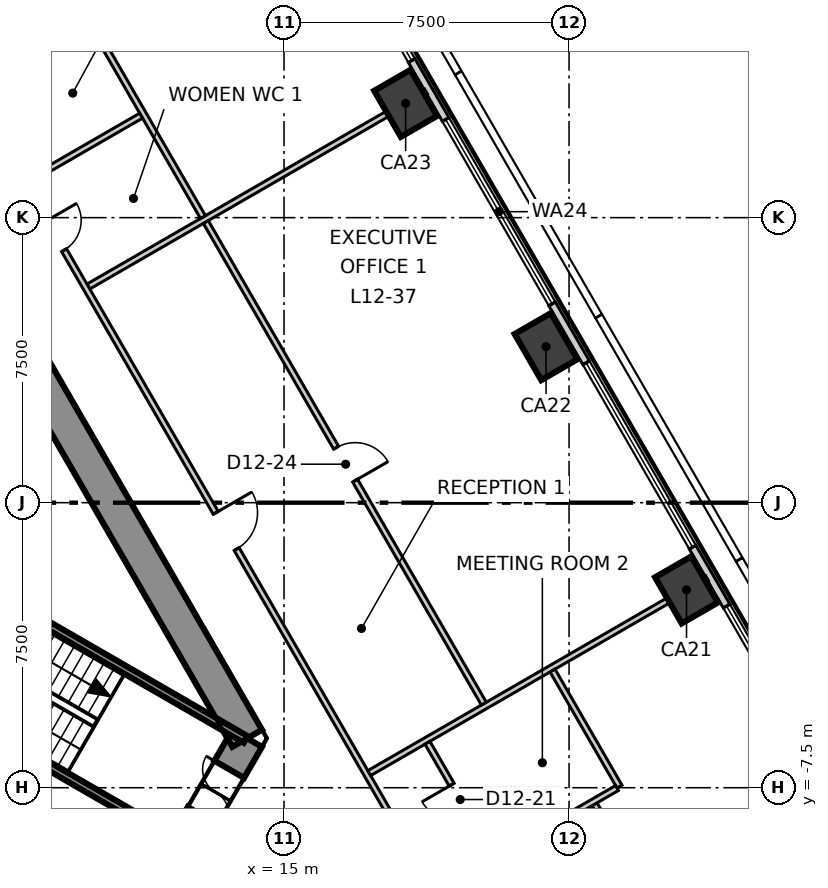
"""IFC4 building model, lengths in metres.
Left out: names, types, materials, properties, quantities, classifications, styles, units other than length and angle.
Written with IfcOpenShell. Run it as: python <this file> out.ifc"""

import sys

from ifc_helpers import new_model, si_unit, direction, frame, frame_2d, origin, origin_2d, place, context, subcontext, project, spatial, polyline, rectangle, outline, extrude, element, fill, save


model = new_model("IFC4")
c1 = context("Model", 3, precision=1e-05, world=origin(), true_north=direction((0.0, 1.0)))
c2 = subcontext(c1, "Body", "Model", "MODEL_VIEW")
j1 = project(units=[si_unit("LENGTHUNIT", "METRE"), si_unit("PLANEANGLEUNIT", "RADIAN")], contexts=[c1])
p1 = place(None, origin())
s1 = spatial("IfcSite", under=j1, at=p1, CompositionType="ELEMENT")
p2 = place(p1, origin())
s2 = spatial("IfcBuilding", under=s1, at=p2, CompositionType="ELEMENT")
p3 = place(p2, frame((0.0, 0.0, 59.3)))
s3 = spatial("IfcBuildingStorey", under=s2, at=p3, CompositionType="ELEMENT", Elevation=59.3)
p4 = place(p3, frame((12.384, -9.05, -0.3), z_axis=(0.0, 0.0, 1.0), x_axis=(0.500111984565, 0.865960739811, 0.0)))
e1 = element("IfcWall", 1, at=p4, inside=s3, PredefinedType="SHEAR", context=c2, shape_type="SweptSolid", body=[
    extrude(outline(polyline([(-0.26, -0.45), (1.646, -0.449), (3.551, -0.449), (3.031, 0.45), (1.646, 0.45), (0.26, 0.45), (-0.26, -0.45)])), origin(), (0.0, 0.0, 1.0), 4.0),
])
p5 = place(p4, frame((0.946, 0.0, 0.3)))
e2 = element("IfcOpeningElement", 2, at=p5, cuts=e1, PredefinedType="OPENING", context=c2, shape_type="SweptSolid", body=[
    extrude(rectangle(XDim=1.4, YDim=2.1, at=frame_2d((0.7, 1.05))), frame((0.0, 0.46, 0.0), z_axis=(0.0, -1.0, 0.0), x_axis=(1.0, 0.0, 0.0)), (0.0, 0.0, 1.0), 0.92),
])
p6 = place(p3, frame((14.03, -6.2, -0.3), z_axis=(0.0, 0.0, 1.0), x_axis=(-0.500026485275, 0.866010111964, 0.0)))
e3 = element("IfcWall", 3, at=p6, inside=s3, PredefinedType="SHEAR", context=c2, shape_type="SweptSolid", body=[
    extrude(outline(polyline([(-0.26, -0.449), (1.685, -0.449), (3.63, -0.449), (5.576, -0.449), (7.521, -0.449), (9.466, -0.449), (11.411, -0.449), (13.357, -0.449), (15.302, -0.449), (17.247, -0.45), (19.192, -0.45), (21.138, -0.45), (23.083, -0.45), (25.028, -0.45), (24.509, 0.449), (22.644, 0.449), (20.778, 0.449), (18.913, 0.449), (17.048, 0.449), (15.182, 0.449), (13.317, 0.449), (11.452, 0.449), (9.587, 0.449), (7.721, 0.45), (5.856, 0.45), (3.991, 0.45), (2.125, 0.45), (0.26, 0.45), (-0.26, -0.449)])), origin(), (0.0, 0.0, 1.0), 4.0),
])
p7 = place(p6, frame((11.484, 0.0, 0.3)))
e4 = element("IfcOpeningElement", 4, at=p7, cuts=e3, PredefinedType="OPENING", context=c2, shape_type="SweptSolid", body=[
    extrude(rectangle(XDim=1.8, YDim=2.1, at=frame_2d((0.9, 1.05))), frame((0.0, 0.46, 0.0), z_axis=(0.0, -1.0, 0.0), x_axis=(1.0, 0.0, 0.0)), (0.0, 0.0, 1.0), 0.92),
])
p8 = place(p6, frame((18.914, 0.0, 0.3)))
e5 = element("IfcOpeningElement", 5, at=p8, cuts=e3, PredefinedType="OPENING", context=c2, shape_type="SweptSolid", body=[
    extrude(rectangle(XDim=1.0, YDim=2.1, at=frame_2d((0.5, 1.05))), frame((0.0, 0.46, 0.0), z_axis=(0.0, -1.0, 0.0), x_axis=(1.0, 0.0, 0.0)), (0.0, 0.0, 1.0), 0.92),
])
for number, where, z_axis, x_axis in (
    (6, (25.591, -2.295, -0.3), (0.0, 0.0, 1.0), (-0.5, 0.866, 0.0)),
    (7, (21.895, 4.106, -0.3), (0.0, 0.0, 1.0), (-0.5, 0.866, 0.0)),
    (8, (18.2, 10.507, -0.3), (0.0, 0.0, 1.0), (-0.5, 0.866, 0.0)),
):
    element("IfcColumn", number, at=place(p3, frame(where, z_axis=z_axis, x_axis=x_axis)), inside=s3, PredefinedType="COLUMN", context=c2, shape_type="SweptSolid", body=[
        extrude(rectangle(XDim=1.4, YDim=1.1, at=origin_2d()), origin(), (0.0, 0.0, 1.0), 4.0),
    ])
p9 = place(p3, frame((34.241, -15.876, 0.0), z_axis=(0.0, 0.0, 1.0), x_axis=(-0.500006313899, 0.866021758423, 0.0)))
e9 = element("IfcWall", 9, at=p9, inside=s3, PredefinedType="ELEMENTEDWALL", context=c2, shape_type="SweptSolid", body=[
    extrude(rectangle(XDim=61.719, YDim=0.2, at=frame_2d((30.859, 0.0))), origin(), (0.0, 0.0, 1.0), 3.7),
])
p10 = place(p9, frame((2.199, 0.0, 0.9)))
e10 = element("IfcOpeningElement", 10, at=p10, cuts=e9, PredefinedType="OPENING", context=c2, shape_type="SweptSolid", body=[
    extrude(rectangle(XDim=5.6, YDim=2.5, at=frame_2d((2.8, 1.25))), frame((0.0, 0.11, 0.0), z_axis=(0.0, -1.0, 0.0), x_axis=(1.0, 0.0, 0.0)), (0.0, 0.0, 1.0), 0.22),
])
p11 = place(p9, frame((9.59, 0.0, 0.9)))
e11 = element("IfcOpeningElement", 11, at=p11, cuts=e9, PredefinedType="OPENING", context=c2, shape_type="SweptSolid", body=[
    extrude(rectangle(XDim=5.6, YDim=2.5, at=frame_2d((2.8, 1.25))), frame((0.0, 0.11, 0.0), z_axis=(0.0, -1.0, 0.0), x_axis=(1.0, 0.0, 0.0)), (0.0, 0.0, 1.0), 0.22),
])
p12 = place(p9, frame((16.982, 0.0, 0.9)))
e12 = element("IfcOpeningElement", 12, at=p12, cuts=e9, PredefinedType="OPENING", context=c2, shape_type="SweptSolid", body=[
    extrude(rectangle(XDim=5.6, YDim=2.5, at=frame_2d((2.8, 1.25))), frame((0.0, 0.11, 0.0), z_axis=(0.0, -1.0, 0.0), x_axis=(1.0, 0.0, 0.0)), (0.0, 0.0, 1.0), 0.22),
])
p13 = place(p9, frame((24.374, 0.0, 0.9)))
e13 = element("IfcOpeningElement", 13, at=p13, cuts=e9, PredefinedType="OPENING", context=c2, shape_type="SweptSolid", body=[
    extrude(rectangle(XDim=5.6, YDim=2.5, at=frame_2d((2.8, 1.25))), frame((0.0, 0.11, 0.0), z_axis=(0.0, -1.0, 0.0), x_axis=(1.0, 0.0, 0.0)), (0.0, 0.0, 1.0), 0.22),
])
p14 = place(p9, frame((31.765, 0.0, 0.9)))
e14 = element("IfcOpeningElement", 14, at=p14, cuts=e9, PredefinedType="OPENING", context=c2, shape_type="SweptSolid", body=[
    extrude(rectangle(XDim=5.6, YDim=2.5, at=frame_2d((2.8, 1.25))), frame((0.0, 0.11, 0.0), z_axis=(0.0, -1.0, 0.0), x_axis=(1.0, 0.0, 0.0)), (0.0, 0.0, 1.0), 0.22),
])
p15 = place(p9, frame((39.157, 0.0, 0.9)))
e15 = element("IfcOpeningElement", 15, at=p15, cuts=e9, PredefinedType="OPENING", context=c2, shape_type="SweptSolid", body=[
    extrude(rectangle(XDim=5.6, YDim=2.5, at=frame_2d((2.8, 1.25))), frame((0.0, 0.11, 0.0), z_axis=(0.0, -1.0, 0.0), x_axis=(1.0, 0.0, 0.0)), (0.0, 0.0, 1.0), 0.22),
])
p16 = place(p9, frame((46.549, 0.0, 0.9)))
e16 = element("IfcOpeningElement", 16, at=p16, cuts=e9, PredefinedType="OPENING", context=c2, shape_type="SweptSolid", body=[
    extrude(rectangle(XDim=5.6, YDim=2.5, at=frame_2d((2.8, 1.25))), frame((0.0, 0.11, 0.0), z_axis=(0.0, -1.0, 0.0), x_axis=(1.0, 0.0, 0.0)), (0.0, 0.0, 1.0), 0.22),
])
p17 = place(p9, frame((53.94, 0.0, 0.9)))
e17 = element("IfcOpeningElement", 17, at=p17, cuts=e9, PredefinedType="OPENING", context=c2, shape_type="SweptSolid", body=[
    extrude(rectangle(XDim=5.6, YDim=2.5, at=frame_2d((2.8, 1.25))), frame((0.0, 0.11, 0.0), z_axis=(0.0, -1.0, 0.0), x_axis=(1.0, 0.0, 0.0)), (0.0, 0.0, 1.0), 0.22),
])
p18 = place(p3, frame((9.851, 5.687, 0.0), z_axis=(0.0, 0.0, 1.0), x_axis=(0.865968814955, 0.500098001921, 0.0)))
e18 = element("IfcWall", 18, at=p18, inside=s3, PredefinedType="PARTITIONING", context=c2, shape_type="SweptSolid", body=[
    extrude(rectangle(XDim=10.26, YDim=0.15, at=frame_2d((5.13, 0.0))), origin(), (0.0, 0.0, 1.0), 3.2),
])
p19 = place(p3, frame((0.075, 22.47, 0.0), z_axis=(0.0, 0.0, 1.0), x_axis=(0.500002280369, -0.866024087209, 0.0)))
e19 = element("IfcWall", 19, at=p19, inside=s3, PredefinedType="PARTITIONING", context=c2, shape_type="SweptSolid", body=[
    extrude(rectangle(XDim=38.844, YDim=0.15, at=frame_2d((19.422, 0.0))), origin(), (0.0, 0.0, 1.0), 3.7),
])
p20 = place(p19, frame((36.044, 0.0, 0.0)))
e20 = element("IfcOpeningElement", 20, at=p20, cuts=e19, PredefinedType="OPENING", context=c2, shape_type="SweptSolid", body=[
    extrude(rectangle(XDim=1.1, YDim=2.1, at=frame_2d((0.55, 1.05))), frame((0.0, 0.085, 0.0), z_axis=(0.0, -1.0, 0.0), x_axis=(1.0, 0.0, 0.0)), (0.0, 0.0, 1.0), 0.17),
])
p21 = place(p19, frame((26.255, 0.0, 0.0)))
e21 = element("IfcOpeningElement", 21, at=p21, cuts=e19, PredefinedType="OPENING", context=c2, shape_type="SweptSolid", body=[
    extrude(rectangle(XDim=1.1, YDim=2.1, at=frame_2d((0.55, 1.05))), frame((0.0, 0.085, 0.0), z_axis=(0.0, -1.0, 0.0), x_axis=(1.0, 0.0, 0.0)), (0.0, 0.0, 1.0), 0.17),
])
p22 = place(p19, frame((9.173, 0.0, 0.0)))
e22 = element("IfcOpeningElement", 22, at=p22, cuts=e19, PredefinedType="OPENING", context=c2, shape_type="SweptSolid", body=[
    extrude(rectangle(XDim=1.1, YDim=2.1, at=frame_2d((0.55, 1.05))), frame((0.0, 0.085, 0.0), z_axis=(0.0, -1.0, 0.0), x_axis=(1.0, 0.0, 0.0)), (0.0, 0.0, 1.0), 0.17),
])
p23 = place(p19, frame((17.373, 0.0, 0.0)))
e23 = element("IfcOpeningElement", 23, at=p23, cuts=e19, PredefinedType="OPENING", context=c2, shape_type="SweptSolid", body=[
    extrude(rectangle(XDim=0.9, YDim=2.1, at=frame_2d((0.45, 1.05))), frame((0.0, 0.085, 0.0), z_axis=(0.0, -1.0, 0.0), x_axis=(1.0, 0.0, 0.0)), (0.0, 0.0, 1.0), 0.17),
])
p24 = place(p19, frame((14.173, 0.0, 0.0)))
e24 = element("IfcOpeningElement", 24, at=p24, cuts=e19, PredefinedType="OPENING", context=c2, shape_type="SweptSolid", body=[
    extrude(rectangle(XDim=0.9, YDim=2.1, at=frame_2d((0.45, 1.05))), frame((0.0, 0.085, 0.0), z_axis=(0.0, -1.0, 0.0), x_axis=(1.0, 0.0, 0.0)), (0.0, 0.0, 1.0), 0.17),
])
p25 = place(p19, frame((11.273, 0.0, 0.0)))
e25 = element("IfcOpeningElement", 25, at=p25, cuts=e19, PredefinedType="OPENING", context=c2, shape_type="SweptSolid", body=[
    extrude(rectangle(XDim=1.0, YDim=2.1, at=frame_2d((0.5, 1.05))), frame((0.0, 0.085, 0.0), z_axis=(0.0, -1.0, 0.0), x_axis=(1.0, 0.0, 0.0)), (0.0, 0.0, 1.0), 0.17),
])
p26 = place(p19, frame((1.689, 0.0, 0.0)))
e26 = element("IfcOpeningElement", 26, at=p26, cuts=e19, PredefinedType="OPENING", context=c2, shape_type="SweptSolid", body=[
    extrude(rectangle(XDim=1.1, YDim=2.1, at=frame_2d((0.55, 1.05))), frame((0.0, 0.085, 0.0), z_axis=(0.0, -1.0, 0.0), x_axis=(1.0, 0.0, 0.0)), (0.0, 0.0, 1.0), 0.17),
])
p27 = place(p3, frame((8.504, 15.07, 0.0), z_axis=(0.0, 0.0, 1.0), x_axis=(0.500042162787, -0.86600105972, 0.0)))
e27 = element("IfcWall", 27, at=p27, inside=s3, PredefinedType="PARTITIONING", context=c2, shape_type="SweptSolid", body=[
    extrude(rectangle(XDim=8.725, YDim=0.15, at=frame_2d((4.363, 0.0))), origin(), (0.0, 0.0, 1.0), 3.7),
])
for number, where, z_axis, x_axis in (
    (28, (6.651, 11.229, 0.0), (0.0, 0.0, 1.0), (0.866, 0.5, 0.0)),
    (29, (8.251, 8.458, 0.0), (0.0, 0.0, 1.0), (0.866, 0.5, 0.0)),
):
    element("IfcWall", number, at=place(p3, frame(where, z_axis=z_axis, x_axis=x_axis)), inside=s3, PredefinedType="PARTITIONING", context=c2, shape_type="SweptSolid", body=[
        extrude(rectangle(XDim=3.45, YDim=0.15, at=frame_2d((1.725, 0.0))), origin(), (0.0, 0.0, 1.0), 3.7),
    ])
p28 = place(p3, frame((17.243, -7.115, 0.0), z_axis=(0.0, 0.0, 1.0), x_axis=(0.866020337685, 0.500008774639, 0.0)))
e30 = element("IfcWall", 30, at=p28, inside=s3, PredefinedType="PARTITIONING", context=c2, shape_type="SweptSolid", body=[
    extrude(rectangle(XDim=10.26, YDim=0.15, at=frame_2d((5.13, 0.0))), origin(), (0.0, 0.0, 1.0), 3.7),
])
p29 = place(p3, frame((23.172, -7.935, 0.0), z_axis=(0.0, 0.0, 1.0), x_axis=(0.500266112279, -0.865871709265, 0.0)))
e31 = element("IfcWall", 31, at=p29, inside=s3, PredefinedType="PARTITIONING", context=c2, shape_type="SweptSolid", body=[
    extrude(rectangle(XDim=2.125, YDim=0.15, at=frame_2d((1.062, 0.0))), origin(), (0.0, 0.0, 1.0), 3.7),
])
p30 = place(p3, frame((18.774, -6.317, 0.0), z_axis=(0.0, 0.0, 1.0), x_axis=(0.499941490393, -0.866059181686, 0.0)))
e32 = element("IfcWall", 32, at=p30, inside=s3, PredefinedType="PARTITIONING", context=c2, shape_type="SweptSolid", body=[
    extrude(rectangle(XDim=5.725, YDim=0.15, at=frame_2d((2.862, 0.0))), origin(), (0.0, 0.0, 1.0), 3.7),
])
p31 = place(p30, frame((1.275, 0.0, 0.0)))
e33 = element("IfcOpeningElement", 33, at=p31, cuts=e32, PredefinedType="OPENING", context=c2, shape_type="SweptSolid", body=[
    extrude(rectangle(XDim=0.9, YDim=2.1, at=frame_2d((0.45, 1.05))), frame((0.0, 0.085, 0.0), z_axis=(0.0, -1.0, 0.0), x_axis=(1.0, 0.0, 0.0)), (0.0, 0.0, 1.0), 0.17),
])
p32 = place(p3, frame((22.065, -4.417, 0.0), z_axis=(0.0, 0.0, 1.0), x_axis=(0.499856357168, -0.86610832013, 0.0)))
e34 = element("IfcWall", 34, at=p32, inside=s3, PredefinedType="PARTITIONING", context=c2, shape_type="SweptSolid", body=[
    extrude(rectangle(XDim=3.525, YDim=0.15, at=frame_2d((1.762, 0.0))), origin(), (0.0, 0.0, 1.0), 3.7),
])
p33 = place(p3, frame((12.942, 7.384, 0.0), z_axis=(0.0, 0.0, 1.0), x_axis=(0.499995423472, -0.866028046028, 0.0)))
e35 = element("IfcWall", 35, at=p33, inside=s3, PredefinedType="PARTITIONING", context=c2, shape_type="SweptSolid", body=[
    extrude(rectangle(XDim=14.633, YDim=0.15, at=frame_2d((7.316, 0.0))), origin(), (0.0, 0.0, 1.0), 3.7),
])
p34 = place(p33, frame((6.857, 0.0, 0.0)))
e36 = element("IfcOpeningElement", 36, at=p34, cuts=e35, PredefinedType="OPENING", context=c2, shape_type="SweptSolid", body=[
    extrude(rectangle(XDim=1.0, YDim=2.1, at=frame_2d((0.5, 1.05))), frame((0.0, 0.085, 0.0), z_axis=(0.0, -1.0, 0.0), x_axis=(1.0, 0.0, 0.0)), (0.0, 0.0, 1.0), 0.17),
])
p35 = place(p3, frame((20.601, -9.333, 0.0), z_axis=(0.0, 0.0, 1.0), x_axis=(0.866024069551, 0.500002310952, 0.0)))
e37 = element("IfcWall", 37, at=p35, inside=s3, PredefinedType="PARTITIONING", context=c2, shape_type="SweptSolid", body=[
    extrude(rectangle(XDim=3.65, YDim=0.15, at=frame_2d((1.825, 0.0))), origin(), (0.0, 0.0, 1.0), 3.7),
])
p36 = place(p3, frame((4.929, -4.693, 0.0), z_axis=(0.0, 0.0, 1.0), x_axis=(0.866010975815, -0.500024989144, 0.0)))
e38 = element("IfcWall", 38, at=p36, inside=s3, PredefinedType="SOLIDWALL", context=c2, shape_type="SweptSolid", body=[
    extrude(rectangle(XDim=8.615, YDim=0.2, at=frame_2d((4.308, 0.0))), origin(), (0.0, 0.0, 1.0), 3.7),
])
p37 = place(p3, frame((6.529, -1.922, 0.0), z_axis=(0.0, 0.0, 1.0), x_axis=(0.866060059011, -0.499939970583, 0.0)))
e39 = element("IfcWall", 39, at=p37, inside=s3, PredefinedType="SOLIDWALL", context=c2, shape_type="SweptSolid", body=[
    extrude(rectangle(XDim=8.615, YDim=0.2, at=frame_2d((4.307, 0.0))), origin(), (0.0, 0.0, 1.0), 3.7),
])
p38 = place(p11, origin())
e40 = element("IfcWindow", 40, at=p38, inside=s3, PartitioningType="SINGLE_PANEL", PredefinedType="WINDOW", context=c2, shape_type="SweptSolid", body=[
    extrude(rectangle(XDim=5.6, YDim=2.5, at=frame_2d((2.8, 1.25))), frame((0.0, 0.03, 0.0), z_axis=(0.0, -1.0, 0.0), x_axis=(1.0, 0.0, 0.0)), (0.0, 0.0, 1.0), 0.06),
])
fill(e11, e40)
p39 = place(p12, origin())
e41 = element("IfcWindow", 41, at=p39, inside=s3, PartitioningType="SINGLE_PANEL", PredefinedType="WINDOW", context=c2, shape_type="SweptSolid", body=[
    extrude(rectangle(XDim=5.6, YDim=2.5, at=frame_2d((2.8, 1.25))), frame((0.0, 0.03, 0.0), z_axis=(0.0, -1.0, 0.0), x_axis=(1.0, 0.0, 0.0)), (0.0, 0.0, 1.0), 0.06),
])
fill(e12, e41)
p40 = place(p13, origin())
e42 = element("IfcWindow", 42, at=p40, inside=s3, PartitioningType="SINGLE_PANEL", PredefinedType="WINDOW", context=c2, shape_type="SweptSolid", body=[
    extrude(rectangle(XDim=5.6, YDim=2.5, at=frame_2d((2.8, 1.25))), frame((0.0, 0.03, 0.0), z_axis=(0.0, -1.0, 0.0), x_axis=(1.0, 0.0, 0.0)), (0.0, 0.0, 1.0), 0.06),
])
fill(e13, e42)
p41 = place(p14, origin())
e43 = element("IfcWindow", 43, at=p41, inside=s3, PartitioningType="SINGLE_PANEL", PredefinedType="WINDOW", context=c2, shape_type="SweptSolid", body=[
    extrude(rectangle(XDim=5.6, YDim=2.5, at=frame_2d((2.8, 1.25))), frame((0.0, 0.03, 0.0), z_axis=(0.0, -1.0, 0.0), x_axis=(1.0, 0.0, 0.0)), (0.0, 0.0, 1.0), 0.06),
])
fill(e14, e43)
p42 = place(p31, origin())
e44 = element("IfcDoor", 44, at=p42, inside=s3, OperationType="SINGLE_SWING_LEFT", PredefinedType="DOOR", context=c2, shape_type="SweptSolid", body=[
    extrude(rectangle(XDim=0.9, YDim=2.1, at=frame_2d((0.45, 1.05))), frame((0.0, 0.025, 0.0), z_axis=(0.0, -1.0, 0.0), x_axis=(1.0, 0.0, 0.0)), (0.0, 0.0, 1.0), 0.05),
])
fill(e33, e44)
p43 = place(p21, origin())
e45 = element("IfcDoor", 45, at=p43, inside=s3, OperationType="SINGLE_SWING_RIGHT", PredefinedType="DOOR", context=c2, shape_type="SweptSolid", body=[
    extrude(rectangle(XDim=1.1, YDim=2.1, at=frame_2d((0.55, 1.05))), frame((0.0, 0.025, 0.0), z_axis=(0.0, -1.0, 0.0), x_axis=(1.0, 0.0, 0.0)), (0.0, 0.0, 1.0), 0.05),
])
fill(e21, e45)
p44 = place(p34, origin())
e46 = element("IfcDoor", 46, at=p44, inside=s3, OperationType="SINGLE_SWING_LEFT", PredefinedType="DOOR", context=c2, shape_type="SweptSolid", body=[
    extrude(rectangle(XDim=1.0, YDim=2.1, at=frame_2d((0.5, 1.05))), frame((0.0, 0.025, 0.0), z_axis=(0.0, -1.0, 0.0), x_axis=(1.0, 0.0, 0.0)), (0.0, 0.0, 1.0), 0.05),
])
fill(e36, e46)
p45 = place(p23, origin())
e47 = element("IfcDoor", 47, at=p45, inside=s3, OperationType="SINGLE_SWING_RIGHT", PredefinedType="DOOR", context=c2, shape_type="SweptSolid", body=[
    extrude(rectangle(XDim=0.9, YDim=2.1, at=frame_2d((0.45, 1.05))), frame((0.0, 0.025, 0.0), z_axis=(0.0, -1.0, 0.0), x_axis=(1.0, 0.0, 0.0)), (0.0, 0.0, 1.0), 0.05),
])
fill(e23, e47)
p46 = place(p5, origin())
e48 = element("IfcDoor", 48, at=p46, inside=s3, OperationType="DOUBLE_DOOR_SINGLE_SWING", PredefinedType="DOOR", context=c2, shape_type="SweptSolid", body=[
    extrude(rectangle(XDim=1.4, YDim=2.1, at=frame_2d((0.7, 1.05))), frame((0.0, 0.025, 0.0), z_axis=(0.0, -1.0, 0.0), x_axis=(1.0, 0.0, 0.0)), (0.0, 0.0, 1.0), 0.05),
])
fill(e2, e48)
save(model, sys.argv[1])
